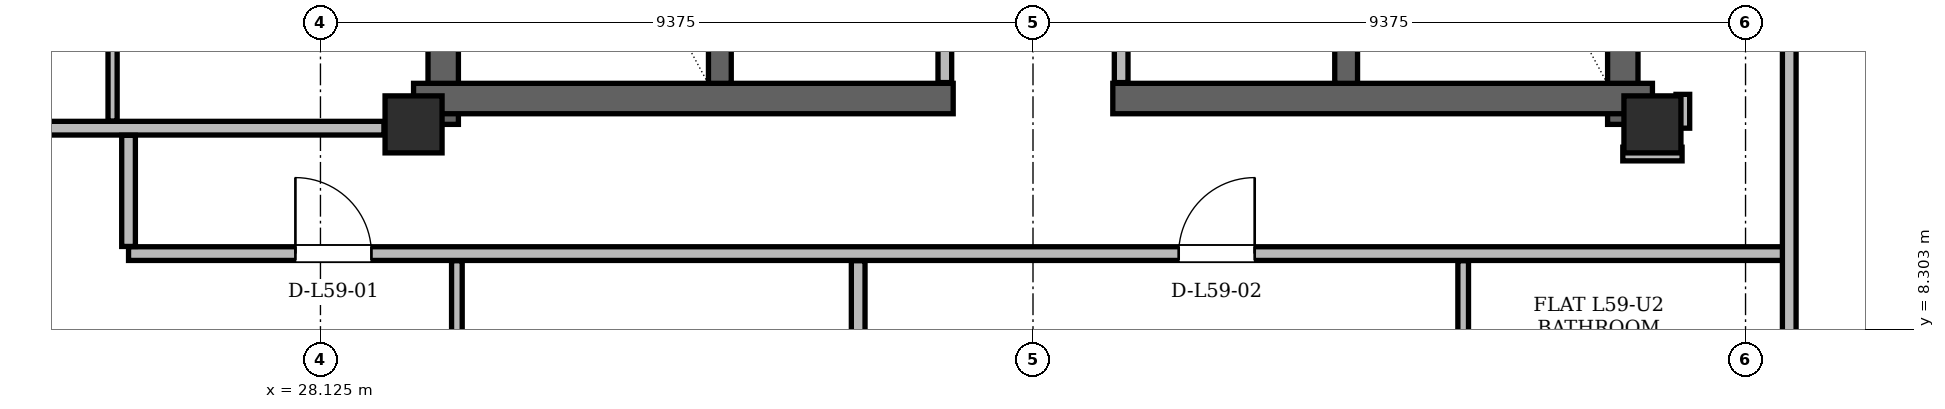
"""IFC4 building model, lengths in metres.
Left out: names, types, materials, properties, quantities, classifications, styles, units other than length and angle.
Written with IfcOpenShell. Run it as: python <this file> out.ifc"""

import sys

from ifc_helpers import new_model, si_unit, direction, frame, frame_2d, origin, origin_2d, place, context, subcontext, project, spatial, rectangle, hollow_rectangle, extrude, element, fill, save


model = new_model("IFC4")
c1 = context("Model", 3, precision=1e-05, world=origin(), true_north=direction((0.0, 1.0)))
c2 = subcontext(c1, "Body", "Model", "MODEL_VIEW")
j1 = project(units=[si_unit("LENGTHUNIT", "METRE"), si_unit("PLANEANGLEUNIT", "RADIAN")], contexts=[c1])
p1 = place(None, origin())
s1 = spatial("IfcSite", under=j1, at=p1, CompositionType="ELEMENT")
p2 = place(p1, origin())
s2 = spatial("IfcBuilding", under=s1, at=p2, CompositionType="ELEMENT")
p3 = place(p2, frame((0.0, 0.0, 223.5)))
s3 = spatial("IfcBuildingStorey", under=s2, at=p3, CompositionType="ELEMENT", Elevation=223.5)
for number, where, z_axis, x_axis in (
    (1, (29.35, 11.0, 0.0), (0.0, 0.0, 1.0), (1.0, 0.0, 0.0)),
    (2, (45.65, 11.0, 0.0), (0.0, 0.0, 1.0), (1.0, 0.0, 0.0)),
):
    element("IfcColumn", number, at=place(p3, frame(where, z_axis=z_axis, x_axis=x_axis)), inside=s3, PredefinedType="COLUMN", context=c2, shape_type="SweptSolid", body=[
        extrude(hollow_rectangle(XDim=0.75, YDim=0.75, WallThickness=0.06, at=origin_2d()), origin(), (0.0, 0.0, 1.0), 3.6),
    ])
for number, where, z_axis, x_axis in (
    (3, (29.74, 11.0, 0.0), (0.0, 0.0, 1.0), (0.0, 1.0, 0.0)),
    (4, (45.26, 11.0, 0.0), (0.0, 0.0, 1.0), (0.0, 1.0, 0.0)),
):
    element("IfcWall", number, at=place(p3, frame(where, z_axis=z_axis, x_axis=x_axis)), inside=s3, PredefinedType="SHEAR", context=c2, shape_type="SweptSolid", body=[
        extrude(rectangle(XDim=13.3, YDim=0.4, at=frame_2d((6.65, 0.0))), origin(), (0.0, 0.0, 1.0), 3.38),
    ])
for number, where, z_axis, x_axis in (
    (5, (29.35, 11.34, 0.0), (0.0, 0.0, 1.0), (1.0, 0.0, 0.0)),
    (6, (38.55, 11.34, 0.0), (0.0, 0.0, 1.0), (1.0, 0.0, 0.0)),
):
    element("IfcWall", number, at=place(p3, frame(where, z_axis=z_axis, x_axis=x_axis)), inside=s3, PredefinedType="SHEAR", context=c2, shape_type="SweptSolid", body=[
        extrude(rectangle(XDim=7.1, YDim=0.4, at=frame_2d((3.55, 0.0))), origin(), (0.0, 0.0, 1.0), 3.38),
    ])
for number, where, z_axis, x_axis in (
    (7, (33.38, 11.54, 0.0), (0.0, 0.0, 1.0), (0.0, 1.0, 0.0)),
    (8, (41.62, 11.54, 0.0), (0.0, 0.0, 1.0), (0.0, 1.0, 0.0)),
):
    element("IfcWall", number, at=place(p3, frame(where, z_axis=z_axis, x_axis=x_axis)), inside=s3, PredefinedType="SHEAR", context=c2, shape_type="SweptSolid", body=[
        extrude(rectangle(XDim=7.62, YDim=0.3, at=frame_2d((3.81, 0.0))), origin(), (0.0, 0.0, 1.0), 3.38),
    ])
p4 = place(p3, frame((59.07, 11.372, 0.0), z_axis=(0.0, 0.0, 1.0), x_axis=(-0.500000292553, 0.866025234879, 0.0)))
e9 = element("IfcWall", 9, at=p4, inside=s3, PredefinedType="SOLIDWALL", context=c2, shape_type="SweptSolid", body=[
    extrude(rectangle(XDim=36.688, YDim=0.29, at=frame_2d((18.344, 0.0))), origin(), (0.0, 0.0, 1.0), 2.677),
])
p5 = place(p4, frame((3.429, 0.0, 0.0)))
e10 = element("IfcOpeningElement", 10, at=p5, cuts=e9, PredefinedType="OPENING", context=c2, shape_type="SweptSolid", body=[
    extrude(rectangle(XDim=1.5, YDim=2.2, at=frame_2d((0.75, 1.1))), frame((0.0, 0.145, 0.0), z_axis=(0.0, -1.0, 0.0), x_axis=(1.0, 0.0, 0.0)), (0.0, 0.0, 1.0), 0.29),
])
p6 = place(p4, frame((27.154, 0.0, 0.0)))
e11 = element("IfcOpeningElement", 11, at=p6, cuts=e9, PredefinedType="OPENING", context=c2, shape_type="SweptSolid", body=[
    extrude(rectangle(XDim=1.5, YDim=2.2, at=frame_2d((0.75, 1.1))), frame((0.0, 0.145, 0.0), z_axis=(0.0, -1.0, 0.0), x_axis=(1.0, 0.0, 0.0)), (0.0, 0.0, 1.0), 0.29),
])
p7 = place(p4, frame((7.878, 0.0, 0.85)))
e12 = element("IfcOpeningElement", 12, at=p7, cuts=e9, PredefinedType="OPENING", context=c2, shape_type="SweptSolid", body=[
    extrude(rectangle(XDim=1.2, YDim=1.48, at=frame_2d((0.6, 0.74))), frame((0.0, 0.145, 0.0), z_axis=(0.0, -1.0, 0.0), x_axis=(1.0, 0.0, 0.0)), (0.0, 0.0, 1.0), 0.29),
])
p8 = place(p4, frame((1.266, 0.0, 0.85)))
e13 = element("IfcOpeningElement", 13, at=p8, cuts=e9, PredefinedType="OPENING", context=c2, shape_type="SweptSolid", body=[
    extrude(rectangle(XDim=1.2, YDim=1.48, at=frame_2d((0.6, 0.74))), frame((0.0, 0.145, 0.0), z_axis=(0.0, -1.0, 0.0), x_axis=(1.0, 0.0, 0.0)), (0.0, 0.0, 1.0), 0.29),
])
p9 = place(p4, frame((12.232, 0.0, 0.85)))
e14 = element("IfcOpeningElement", 14, at=p9, cuts=e9, PredefinedType="OPENING", context=c2, shape_type="SweptSolid", body=[
    extrude(rectangle(XDim=2.0, YDim=1.717, at=frame_2d((1.0, 0.858))), frame((0.0, 0.145, 0.0), z_axis=(0.0, -1.0, 0.0), x_axis=(1.0, 0.0, 0.0)), (0.0, 0.0, 1.0), 0.29),
])
p10 = place(p4, frame((17.268, 0.0, 0.85)))
e15 = element("IfcOpeningElement", 15, at=p10, cuts=e9, PredefinedType="OPENING", context=c2, shape_type="SweptSolid", body=[
    extrude(rectangle(XDim=1.4, YDim=1.6, at=frame_2d((0.7, 0.8))), frame((0.0, 0.145, 0.0), z_axis=(0.0, -1.0, 0.0), x_axis=(1.0, 0.0, 0.0)), (0.0, 0.0, 1.0), 0.29),
])
p11 = place(p4, frame((20.594, 0.0, 0.85)))
e16 = element("IfcOpeningElement", 16, at=p11, cuts=e9, PredefinedType="OPENING", context=c2, shape_type="SweptSolid", body=[
    extrude(rectangle(XDim=1.2, YDim=1.48, at=frame_2d((0.6, 0.74))), frame((0.0, 0.145, 0.0), z_axis=(0.0, -1.0, 0.0), x_axis=(1.0, 0.0, 0.0)), (0.0, 0.0, 1.0), 0.29),
])
p12 = place(p4, frame((34.312, 0.0, 0.85)))
e17 = element("IfcOpeningElement", 17, at=p12, cuts=e9, PredefinedType="OPENING", context=c2, shape_type="SweptSolid", body=[
    extrude(rectangle(XDim=1.2, YDim=1.48, at=frame_2d((0.6, 0.74))), frame((0.0, 0.145, 0.0), z_axis=(0.0, -1.0, 0.0), x_axis=(1.0, 0.0, 0.0)), (0.0, 0.0, 1.0), 0.29),
])
p13 = place(p3, frame((34.274, 43.144, 0.0), z_axis=(0.0, 0.0, 1.0), x_axis=(-0.500000292553, -0.866025234879, 0.0)))
e18 = element("IfcWall", 18, at=p13, inside=s3, PredefinedType="SOLIDWALL", context=c2, shape_type="SweptSolid", body=[
    extrude(rectangle(XDim=36.688, YDim=0.29, at=frame_2d((18.344, 0.0))), origin(), (0.0, 0.0, 1.0), 2.677),
])
p14 = place(p13, frame((3.429, 0.0, 0.0)))
e19 = element("IfcOpeningElement", 19, at=p14, cuts=e18, PredefinedType="OPENING", context=c2, shape_type="SweptSolid", body=[
    extrude(rectangle(XDim=1.5, YDim=2.2, at=frame_2d((0.75, 1.1))), frame((0.0, 0.145, 0.0), z_axis=(0.0, -1.0, 0.0), x_axis=(1.0, 0.0, 0.0)), (0.0, 0.0, 1.0), 0.29),
])
p15 = place(p13, frame((27.154, 0.0, 0.0)))
e20 = element("IfcOpeningElement", 20, at=p15, cuts=e18, PredefinedType="OPENING", context=c2, shape_type="SweptSolid", body=[
    extrude(rectangle(XDim=1.5, YDim=2.2, at=frame_2d((0.75, 1.1))), frame((0.0, 0.145, 0.0), z_axis=(0.0, -1.0, 0.0), x_axis=(1.0, 0.0, 0.0)), (0.0, 0.0, 1.0), 0.29),
])
p16 = place(p13, frame((22.893, 0.0, 0.85)))
e21 = element("IfcOpeningElement", 21, at=p16, cuts=e18, PredefinedType="OPENING", context=c2, shape_type="SweptSolid", body=[
    extrude(rectangle(XDim=1.2, YDim=1.48, at=frame_2d((0.6, 0.74))), frame((0.0, 0.145, 0.0), z_axis=(0.0, -1.0, 0.0), x_axis=(1.0, 0.0, 0.0)), (0.0, 0.0, 1.0), 0.29),
])
p17 = place(p13, frame((33.124, 0.0, 0.85)))
e22 = element("IfcOpeningElement", 22, at=p17, cuts=e18, PredefinedType="OPENING", context=c2, shape_type="SweptSolid", body=[
    extrude(rectangle(XDim=1.2, YDim=1.48, at=frame_2d((0.6, 0.74))), frame((0.0, 0.145, 0.0), z_axis=(0.0, -1.0, 0.0), x_axis=(1.0, 0.0, 0.0)), (0.0, 0.0, 1.0), 0.29),
])
p18 = place(p13, frame((8.469, 0.0, 0.85)))
e23 = element("IfcOpeningElement", 23, at=p18, cuts=e18, PredefinedType="OPENING", context=c2, shape_type="SweptSolid", body=[
    extrude(rectangle(XDim=1.2, YDim=1.48, at=frame_2d((0.6, 0.74))), frame((0.0, 0.145, 0.0), z_axis=(0.0, -1.0, 0.0), x_axis=(1.0, 0.0, 0.0)), (0.0, 0.0, 1.0), 0.29),
])
p19 = place(p13, frame((15.521, 0.0, 0.85)))
e24 = element("IfcOpeningElement", 24, at=p19, cuts=e18, PredefinedType="OPENING", context=c2, shape_type="SweptSolid", body=[
    extrude(rectangle(XDim=2.8, YDim=1.717, at=frame_2d((1.4, 0.858))), frame((0.0, 0.145, 0.0), z_axis=(0.0, -1.0, 0.0), x_axis=(1.0, 0.0, 0.0)), (0.0, 0.0, 1.0), 0.29),
])
p20 = place(p13, frame((1.499, 0.0, 0.85)))
e25 = element("IfcOpeningElement", 25, at=p20, cuts=e18, PredefinedType="OPENING", context=c2, shape_type="SweptSolid", body=[
    extrude(rectangle(XDim=1.2, YDim=1.48, at=frame_2d((0.6, 0.74))), frame((0.0, 0.145, 0.0), z_axis=(0.0, -1.0, 0.0), x_axis=(1.0, 0.0, 0.0)), (0.0, 0.0, 1.0), 0.29),
])
p21 = place(p3, frame((36.34, 11.55, 0.0), z_axis=(0.0, 0.0, 1.0), x_axis=(0.0, 1.0, 0.0)))
e26 = element("IfcWall", 26, at=p21, inside=s3, PredefinedType="PARTITIONING", context=c2, shape_type="SweptSolid", body=[
    extrude(rectangle(XDim=5.55, YDim=0.18, at=frame_2d((2.775, 0.0))), origin(), (0.0, 0.0, 1.0), 3.38),
])
p22 = place(p21, frame((2.85, 0.0, 0.0)))
e27 = element("IfcOpeningElement", 27, at=p22, cuts=e26, PredefinedType="OPENING", context=c2, shape_type="SweptSolid", body=[
    extrude(rectangle(XDim=0.95, YDim=2.1, at=frame_2d((0.475, 1.05))), frame((0.0, 0.09, 0.0), z_axis=(0.0, -1.0, 0.0), x_axis=(1.0, 0.0, 0.0)), (0.0, 0.0, 1.0), 0.18),
])
p23 = place(p3, frame((38.66, 11.55, 0.0), z_axis=(0.0, 0.0, 1.0), x_axis=(0.0, 1.0, 0.0)))
e28 = element("IfcWall", 28, at=p23, inside=s3, PredefinedType="PARTITIONING", context=c2, shape_type="SweptSolid", body=[
    extrude(rectangle(XDim=5.55, YDim=0.18, at=frame_2d((2.775, 0.0))), origin(), (0.0, 0.0, 1.0), 3.38),
])
p24 = place(p23, frame((3.15, 0.0, 0.0)))
e29 = element("IfcOpeningElement", 29, at=p24, cuts=e28, PredefinedType="OPENING", context=c2, shape_type="SweptSolid", body=[
    extrude(rectangle(XDim=0.95, YDim=2.1, at=frame_2d((0.475, 1.05))), frame((0.0, 0.09, 0.0), z_axis=(0.0, -1.0, 0.0), x_axis=(1.0, 0.0, 0.0)), (0.0, 0.0, 1.0), 0.18),
])
p25 = place(p3, frame((25.6, 9.3, 0.0), z_axis=(0.0, 0.0, 1.0), x_axis=(1.0, 0.0, 0.0)))
e30 = element("IfcWall", 30, at=p25, inside=s3, PredefinedType="PARTITIONING", context=c2, shape_type="SweptSolid", body=[
    extrude(rectangle(XDim=21.85, YDim=0.18, at=frame_2d((10.925, 0.0))), origin(), (0.0, 0.0, 1.0), 2.913),
])
p26 = place(p25, frame((2.195, 0.0, 0.0)))
e31 = element("IfcOpeningElement", 31, at=p26, cuts=e30, PredefinedType="OPENING", context=c2, shape_type="SweptSolid", body=[
    extrude(rectangle(XDim=1.0, YDim=2.18, at=frame_2d((0.5, 1.09))), frame((0.0, 0.09, 0.0), z_axis=(0.0, -1.0, 0.0), x_axis=(1.0, 0.0, 0.0)), (0.0, 0.0, 1.0), 0.18),
])
p27 = place(p25, frame((13.817, 0.0, 0.0)))
e32 = element("IfcOpeningElement", 32, at=p27, cuts=e30, PredefinedType="OPENING", context=c2, shape_type="SweptSolid", body=[
    extrude(rectangle(XDim=1.0, YDim=2.18, at=frame_2d((0.5, 1.09))), frame((0.0, 0.09, 0.0), z_axis=(0.0, -1.0, 0.0), x_axis=(1.0, 0.0, 0.0)), (0.0, 0.0, 1.0), 0.18),
])
p28 = place(p3, frame((45.26, 10.61, 0.0), z_axis=(0.0, 0.0, 1.0), x_axis=(1.0, 0.0, 0.0)))
e33 = element("IfcWall", 33, at=p28, inside=s3, PredefinedType="PARTITIONING", context=c2, shape_type="SweptSolid", body=[
    extrude(rectangle(XDim=0.78, YDim=0.18, at=frame_2d((0.39, 0.0))), origin(), (0.0, 0.0, 1.0), 3.38),
])
p29 = place(p3, frame((16.345, 10.95, 0.0), z_axis=(0.0, 0.0, 1.0), x_axis=(1.0, 0.0, 0.0)))
e34 = element("IfcWall", 34, at=p29, inside=s3, PredefinedType="PARTITIONING", context=c2, shape_type="SweptSolid", body=[
    extrude(rectangle(XDim=12.615, YDim=0.18, at=frame_2d((6.307, 0.0))), origin(), (0.0, 0.0, 1.0), 2.913),
])
p30 = place(p3, frame((25.39, 11.044, 0.0), z_axis=(0.0, 0.0, 1.0), x_axis=(0.0, 1.0, 0.0)))
e35 = element("IfcWall", 35, at=p30, inside=s3, PredefinedType="PARTITIONING", context=c2, shape_type="SweptSolid", body=[
    extrude(rectangle(XDim=3.592, YDim=0.12, at=frame_2d((1.796, 0.0))), origin(), (0.0, 0.0, 1.0), 3.38),
])
p31 = place(p3, frame((25.6, 9.394, 0.0), z_axis=(0.0, 0.0, 1.0), x_axis=(0.0, 1.0, 0.0)))
e36 = element("IfcWall", 36, at=p31, inside=s3, PredefinedType="PARTITIONING", context=c2, shape_type="SweptSolid", body=[
    extrude(rectangle(XDim=1.462, YDim=0.18, at=frame_2d((0.731, 0.0))), origin(), (0.0, 0.0, 1.0), 3.38),
])
p32 = place(p3, frame((29.92, 5.933, 0.0), z_axis=(0.0, 0.0, 1.0), x_axis=(0.0, 1.0, 0.0)))
e37 = element("IfcWall", 37, at=p32, inside=s3, PredefinedType="PARTITIONING", context=c2, shape_type="SweptSolid", body=[
    extrude(rectangle(XDim=3.273, YDim=0.14, at=frame_2d((1.636, 0.0))), origin(), (0.0, 0.0, 1.0), 3.38),
])
p33 = place(p32, frame((1.244, 0.0, 0.0)))
e38 = element("IfcOpeningElement", 38, at=p33, cuts=e37, PredefinedType="OPENING", context=c2, shape_type="SweptSolid", body=[
    extrude(rectangle(XDim=0.88, YDim=2.08, at=frame_2d((0.44, 1.04))), frame((0.0, 0.07, 0.0), z_axis=(0.0, -1.0, 0.0), x_axis=(1.0, 0.0, 0.0)), (0.0, 0.0, 1.0), 0.14),
])
p34 = place(p3, frame((35.2, 5.933, 0.0), z_axis=(0.0, 0.0, 1.0), x_axis=(0.0, 1.0, 0.0)))
e39 = element("IfcWall", 39, at=p34, inside=s3, PredefinedType="PARTITIONING", context=c2, shape_type="SweptSolid", body=[
    extrude(rectangle(XDim=3.273, YDim=0.18, at=frame_2d((1.636, 0.0))), origin(), (0.0, 0.0, 1.0), 3.38),
])
p35 = place(p3, frame((43.16, 5.933, 0.0), z_axis=(0.0, 0.0, 1.0), x_axis=(0.0, 1.0, 0.0)))
e40 = element("IfcWall", 40, at=p35, inside=s3, PredefinedType="PARTITIONING", context=c2, shape_type="SweptSolid", body=[
    extrude(rectangle(XDim=3.273, YDim=0.14, at=frame_2d((1.636, 0.0))), origin(), (0.0, 0.0, 1.0), 3.38),
])
p36 = place(p35, frame((1.244, 0.0, 0.0)))
e41 = element("IfcOpeningElement", 41, at=p36, cuts=e40, PredefinedType="OPENING", context=c2, shape_type="SweptSolid", body=[
    extrude(rectangle(XDim=0.88, YDim=2.08, at=frame_2d((0.44, 1.04))), frame((0.0, 0.07, 0.0), z_axis=(0.0, -1.0, 0.0), x_axis=(1.0, 0.0, 0.0)), (0.0, 0.0, 1.0), 0.14),
])
p37 = place(p3, frame((46.05, 10.95, 0.0), z_axis=(0.0, 0.0, 1.0), x_axis=(0.0, 1.0, 0.0)))
e42 = element("IfcWall", 42, at=p37, inside=s3, PredefinedType="PARTITIONING", context=c2, shape_type="SweptSolid", body=[
    extrude(rectangle(XDim=0.445, YDim=0.18, at=frame_2d((0.223, 0.0))), origin(), (0.0, 0.0, 1.0), 2.913),
])
p38 = place(p3, frame((47.45, 5.933, 0.0), z_axis=(0.0, 0.0, 1.0), x_axis=(0.0, 1.0, 0.0)))
e43 = element("IfcWall", 43, at=p38, inside=s3, PredefinedType="PARTITIONING", context=c2, shape_type="SweptSolid", body=[
    extrude(rectangle(XDim=25.267, YDim=0.18, at=frame_2d((12.634, 0.0))), origin(), (0.0, 0.0, 1.0), 2.913),
])
p39 = place(p38, frame((8.989, 0.0, 0.0)))
e44 = element("IfcOpeningElement", 44, at=p39, cuts=e43, PredefinedType="OPENING", context=c2, shape_type="SweptSolid", body=[
    extrude(rectangle(XDim=1.0, YDim=2.18, at=frame_2d((0.5, 1.09))), frame((0.0, 0.09, 0.0), z_axis=(0.0, -1.0, 0.0), x_axis=(1.0, 0.0, 0.0)), (0.0, 0.0, 1.0), 0.18),
])
p40 = place(p38, frame((15.779, 0.0, 0.0)))
e45 = element("IfcOpeningElement", 45, at=p40, cuts=e43, PredefinedType="OPENING", context=c2, shape_type="SweptSolid", body=[
    extrude(rectangle(XDim=1.0, YDim=2.18, at=frame_2d((0.5, 1.09))), frame((0.0, 0.09, 0.0), z_axis=(0.0, -1.0, 0.0), x_axis=(1.0, 0.0, 0.0)), (0.0, 0.0, 1.0), 0.18),
])
p41 = place(p26, origin())
e46 = element("IfcDoor", 46, at=p41, inside=s3, OperationType="SINGLE_SWING_LEFT", PredefinedType="DOOR", context=c2, shape_type="SweptSolid", body=[
    extrude(rectangle(XDim=1.0, YDim=2.18, at=frame_2d((0.5, 1.09))), frame((0.0, 0.025, 0.0), z_axis=(0.0, -1.0, 0.0), x_axis=(1.0, 0.0, 0.0)), (0.0, 0.0, 1.0), 0.05),
])
fill(e31, e46)
p42 = place(p27, origin())
e47 = element("IfcDoor", 47, at=p42, inside=s3, OperationType="SINGLE_SWING_RIGHT", PredefinedType="DOOR", context=c2, shape_type="SweptSolid", body=[
    extrude(rectangle(XDim=1.0, YDim=2.18, at=frame_2d((0.5, 1.09))), frame((0.0, 0.025, 0.0), z_axis=(0.0, -1.0, 0.0), x_axis=(1.0, 0.0, 0.0)), (0.0, 0.0, 1.0), 0.05),
])
fill(e32, e47)
save(model, sys.argv[1])
